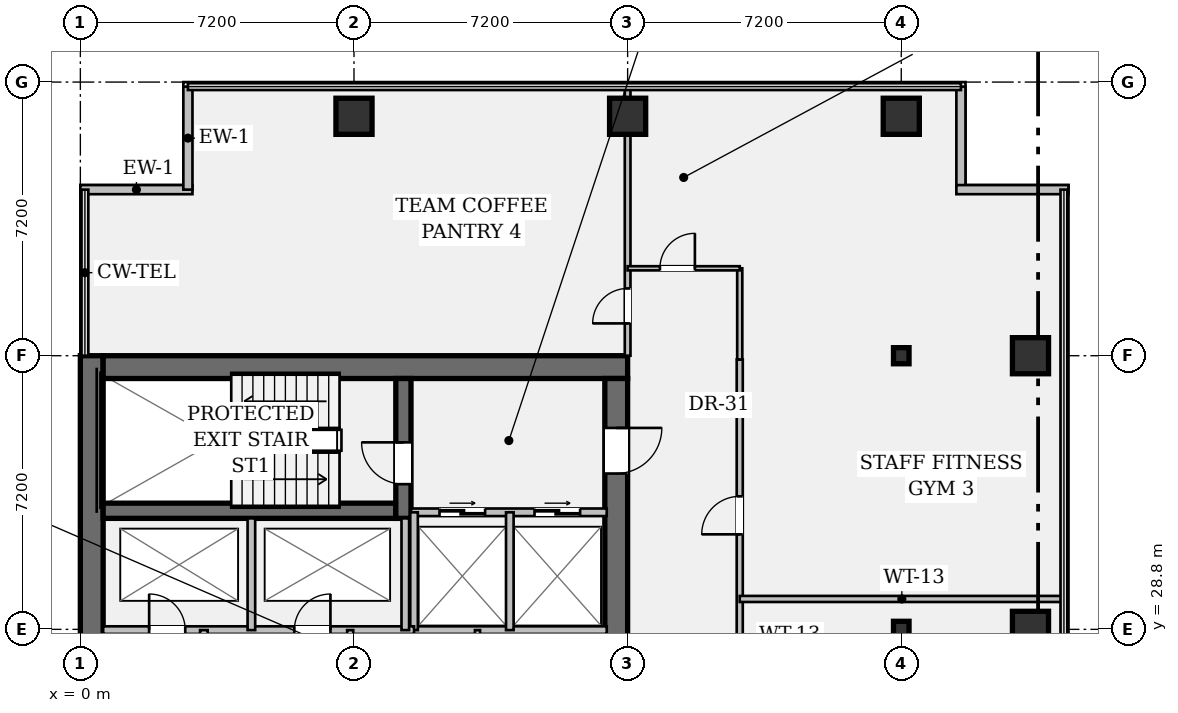
"""IFC4 building model, lengths in metres.
Left out: names, types, materials, properties, quantities, classifications, styles, units other than length and angle.
Written with IfcOpenShell. Run it as: python <this file> out.ifc"""

import sys

from ifc_helpers import new_model, si_unit, direction, frame, frame_2d, origin, origin_2d, place, context, subcontext, project, spatial, rectangle, hollow_rectangle, i_section, extrude, element, fill, save


model = new_model("IFC4")
c1 = context("Model", 3, precision=1e-05, world=origin(), true_north=direction((0.0, 1.0)))
c2 = subcontext(c1, "Body", "Model", "MODEL_VIEW")
j1 = project(units=[si_unit("LENGTHUNIT", "METRE"), si_unit("PLANEANGLEUNIT", "RADIAN")], contexts=[c1])
p1 = place(None, origin())
s1 = spatial("IfcSite", under=j1, at=p1, CompositionType="ELEMENT")
p2 = place(p1, origin())
s2 = spatial("IfcBuilding", under=s1, at=p2, CompositionType="ELEMENT")
p3 = place(p2, frame((0.0, 0.0, 109.9)))
s3 = spatial("IfcBuildingStorey", under=s2, at=p3, CompositionType="ELEMENT", Elevation=109.9)
p4 = place(p3, frame((0.3, 7.2, 0.0), z_axis=(0.0, 0.0, 1.0), x_axis=(0.0, 1.0, 0.0)))
e1 = element("IfcWall", 1, at=p4, inside=s3, PredefinedType="SHEAR", context=c2, shape_type="SweptSolid", body=[
    extrude(rectangle(XDim=28.8, YDim=0.6, at=frame_2d((14.4, 0.0))), origin(), (0.0, 0.0, 1.0), 3.58),
])
p5 = place(p3, frame((0.6, 35.7, 0.0), z_axis=(0.0, 0.0, 1.0), x_axis=(1.0, 0.0, 0.0)))
e2 = element("IfcWall", 2, at=p5, inside=s3, PredefinedType="SHEAR", context=c2, shape_type="SweptSolid", body=[
    extrude(rectangle(XDim=13.8, YDim=0.6, at=frame_2d((6.9, 0.0))), origin(), (0.0, 0.0, 1.0), 3.58),
])
p6 = place(p3, frame((14.1, 35.4, 0.0), z_axis=(0.0, 0.0, 1.0), x_axis=(0.0, -1.0, 0.0)))
e3 = element("IfcWall", 3, at=p6, inside=s3, PredefinedType="SHEAR", context=c2, shape_type="SweptSolid", body=[
    extrude(rectangle(XDim=27.6, YDim=0.6, at=frame_2d((13.8, 0.0))), origin(), (0.0, 0.0, 1.0), 3.58),
])
p7 = place(p6, frame((1.3, 0.0, 0.0)))
e4 = element("IfcOpeningElement", 4, at=p7, cuts=e3, PredefinedType="OPENING", context=c2, shape_type="SweptSolid", body=[
    extrude(rectangle(XDim=1.2, YDim=2.15, at=frame_2d((0.6, 1.075))), frame((0.0, 0.312, 0.0), z_axis=(0.0, -1.0, 0.0), x_axis=(1.0, 0.0, 0.0)), (0.0, 0.0, 1.0), 0.624),
])
p8 = place(p6, frame((25.25, 0.0, 0.0)))
e5 = element("IfcOpeningElement", 5, at=p8, cuts=e3, PredefinedType="OPENING", context=c2, shape_type="SweptSolid", body=[
    extrude(rectangle(XDim=1.2, YDim=2.15, at=frame_2d((0.6, 1.075))), frame((0.0, 0.312, 0.0), z_axis=(0.0, -1.0, 0.0), x_axis=(1.0, 0.0, 0.0)), (0.0, 0.0, 1.0), 0.624),
])
p9 = place(p6, frame((14.6, 0.0, 0.0)))
e6 = element("IfcOpeningElement", 6, at=p9, cuts=e3, PredefinedType="OPENING", context=c2, shape_type="SweptSolid", body=[
    extrude(rectangle(XDim=1.6, YDim=2.2, at=frame_2d((0.8, 1.1))), frame((0.0, 0.312, 0.0), z_axis=(0.0, -1.0, 0.0), x_axis=(1.0, 0.0, 0.0)), (0.0, 0.0, 1.0), 0.624),
])
p10 = place(p3, frame((0.6, 31.92, 0.0), z_axis=(0.0, 0.0, 1.0), x_axis=(1.0, 0.0, 0.0)))
e7 = element("IfcWall", 7, at=p10, inside=s3, PredefinedType="SHEAR", context=c2, shape_type="SweptSolid", body=[
    extrude(rectangle(XDim=7.7, YDim=0.4, at=frame_2d((3.85, 0.0))), origin(), (0.0, 0.0, 1.0), 3.58),
])
p11 = place(p3, frame((8.5, 31.72, 0.0), z_axis=(0.0, 0.0, 1.0), x_axis=(0.0, 1.0, 0.0)))
e8 = element("IfcWall", 8, at=p11, inside=s3, PredefinedType="SHEAR", context=c2, shape_type="SweptSolid", body=[
    extrude(rectangle(XDim=3.68, YDim=0.4, at=frame_2d((1.84, 0.0))), origin(), (0.0, 0.0, 1.0), 3.58),
])
p12 = place(p11, frame((0.9, 0.0, 0.0)))
e9 = element("IfcOpeningElement", 9, at=p12, cuts=e8, PredefinedType="OPENING", context=c2, shape_type="SweptSolid", body=[
    extrude(rectangle(XDim=1.1, YDim=2.15, at=frame_2d((0.55, 1.075))), frame((0.0, 0.212, 0.0), z_axis=(0.0, -1.0, 0.0), x_axis=(1.0, 0.0, 0.0)), (0.0, 0.0, 1.0), 0.424),
])
for number, where, z_axis, x_axis in (
    (10, (7.2, 42.3, 0.0), (0.0, 0.0, 1.0), (1.0, 0.0, 0.0)),
    (11, (14.4, 42.3, 0.0), (0.0, 0.0, 1.0), (1.0, 0.0, 0.0)),
):
    element("IfcColumn", number, at=place(p3, frame(where, z_axis=z_axis, x_axis=x_axis)), inside=s3, PredefinedType="COLUMN", context=c2, shape_type="SweptSolid", body=[
        extrude(hollow_rectangle(XDim=0.95, YDim=0.95, WallThickness=0.06, at=origin_2d()), origin(), (0.0, 0.0, 1.0), 3.58),
    ])
for number, where, z_axis, x_axis in (
    (12, (21.6, 28.8, 0.0), (0.0, 0.0, 1.0), (1.0, 0.0, 0.0)),
    (13, (21.6, 36.0, 0.0), (0.0, 0.0, 1.0), (1.0, 0.0, 0.0)),
):
    element("IfcColumn", number, at=place(p3, frame(where, z_axis=z_axis, x_axis=x_axis)), inside=s3, PredefinedType="COLUMN", context=c2, shape_type="SweptSolid", body=[
        extrude(i_section(OverallWidth=0.409, OverallDepth=0.424, WebThickness=0.033, FlangeThickness=0.052, FilletRadius=0.018, at=origin_2d()), origin(), (0.0, 0.0, 1.0), 3.58),
    ])
for number, where, z_axis, x_axis in (
    (14, (21.6, 42.3, 0.0), (0.0, 0.0, 1.0), (1.0, 0.0, 0.0)),
    (15, (25.0, 28.8, 0.0), (0.0, 0.0, 1.0), (1.0, 0.0, 0.0)),
    (16, (25.0, 36.0, 0.0), (0.0, 0.0, 1.0), (1.0, 0.0, 0.0)),
):
    element("IfcColumn", number, at=place(p3, frame(where, z_axis=z_axis, x_axis=x_axis)), inside=s3, PredefinedType="COLUMN", context=c2, shape_type="SweptSolid", body=[
        extrude(hollow_rectangle(XDim=0.95, YDim=0.95, WallThickness=0.06, at=origin_2d()), origin(), (0.0, 0.0, 1.0), 3.58),
    ])
p13 = place(p3, frame((0.0, 40.37, 0.0), z_axis=(0.0, 0.0, 1.0), x_axis=(1.0, 0.0, 0.0)))
e17 = element("IfcWall", 17, at=p13, inside=s3, PredefinedType="STANDARD", context=c2, shape_type="SweptSolid", body=[
    extrude(rectangle(XDim=2.95, YDim=0.24, at=frame_2d((1.475, 0.0))), origin(), (0.0, 0.0, 1.0), 3.58),
])
for number, where, z_axis, x_axis in (
    (18, (2.83, 40.37, 0.0), (0.0, 0.0, 1.0), (0.0, 1.0, 0.0)),
    (19, (23.17, 43.08, 0.0), (0.0, 0.0, 1.0), (0.0, -1.0, 0.0)),
):
    element("IfcWall", number, at=place(p3, frame(where, z_axis=z_axis, x_axis=x_axis)), inside=s3, PredefinedType="STANDARD", context=c2, shape_type="SweptSolid", body=[
        extrude(rectangle(XDim=2.71, YDim=0.24, at=frame_2d((1.355, 0.0))), origin(), (0.0, 0.0, 1.0), 3.58),
    ])
p14 = place(p3, frame((23.05, 40.37, 0.0), z_axis=(0.0, 0.0, 1.0), x_axis=(1.0, 0.0, 0.0)))
e20 = element("IfcWall", 20, at=p14, inside=s3, PredefinedType="STANDARD", context=c2, shape_type="SweptSolid", body=[
    extrude(rectangle(XDim=2.95, YDim=0.24, at=frame_2d((1.475, 0.0))), origin(), (0.0, 0.0, 1.0), 3.58),
])
p15 = place(p3, frame((8.7, 31.88, 0.0), z_axis=(0.0, 0.0, 1.0), x_axis=(1.0, 0.0, 0.0)))
e21 = element("IfcWall", 21, at=p15, inside=s3, PredefinedType="PARTITIONING", context=c2, shape_type="SweptSolid", body=[
    extrude(rectangle(XDim=5.15, YDim=0.2, at=frame_2d((2.575, 0.0))), origin(), (0.0, 0.0, 1.0), 3.58),
])
p16 = place(p15, frame((0.75, 0.0, 0.0)))
e22 = element("IfcOpeningElement", 22, at=p16, cuts=e21, PredefinedType="OPENING", context=c2, shape_type="SweptSolid", body=[
    extrude(rectangle(XDim=1.2, YDim=2.2, at=frame_2d((0.6, 1.1))), frame((0.0, 0.112, 0.0), z_axis=(0.0, -1.0, 0.0), x_axis=(1.0, 0.0, 0.0)), (0.0, 0.0, 1.0), 0.224),
])
p17 = place(p15, frame((3.25, 0.0, 0.0)))
e23 = element("IfcOpeningElement", 23, at=p17, cuts=e21, PredefinedType="OPENING", context=c2, shape_type="SweptSolid", body=[
    extrude(rectangle(XDim=1.2, YDim=2.2, at=frame_2d((0.6, 1.1))), frame((0.0, 0.112, 0.0), z_axis=(0.0, -1.0, 0.0), x_axis=(1.0, 0.0, 0.0)), (0.0, 0.0, 1.0), 0.224),
])
p18 = place(p3, frame((8.7, 28.78, 0.0), z_axis=(0.0, 0.0, 1.0), x_axis=(1.0, 0.0, 0.0)))
e24 = element("IfcWall", 24, at=p18, inside=s3, PredefinedType="PARTITIONING", context=c2, shape_type="SweptSolid", body=[
    extrude(rectangle(XDim=5.15, YDim=0.2, at=frame_2d((2.575, 0.0))), origin(), (0.0, 0.0, 1.0), 3.58),
])
for number, where, z_axis, x_axis in (
    (25, (8.78, 28.78, 0.0), (0.0, 0.0, 1.0), (0.0, 1.0, 0.0)),
    (26, (11.3, 28.78, 0.0), (0.0, 0.0, 1.0), (0.0, 1.0, 0.0)),
):
    element("IfcWall", number, at=place(p3, frame(where, z_axis=z_axis, x_axis=x_axis)), inside=s3, PredefinedType="PARTITIONING", context=c2, shape_type="SweptSolid", body=[
        extrude(rectangle(XDim=3.1, YDim=0.2, at=frame_2d((1.55, 0.0))), origin(), (0.0, 0.0, 1.0), 3.58),
    ])
p19 = place(p3, frame((0.6, 28.78, 0.0), z_axis=(0.0, 0.0, 1.0), x_axis=(1.0, 0.0, 0.0)))
e27 = element("IfcWall", 27, at=p19, inside=s3, PredefinedType="PARTITIONING", context=c2, shape_type="SweptSolid", body=[
    extrude(rectangle(XDim=8.18, YDim=0.2, at=frame_2d((4.09, 0.0))), origin(), (0.0, 0.0, 1.0), 3.58),
])
p20 = place(p19, frame((1.21, 0.0, 0.0)))
e28 = element("IfcOpeningElement", 28, at=p20, cuts=e27, PredefinedType="OPENING", context=c2, shape_type="SweptSolid", body=[
    extrude(rectangle(XDim=0.95, YDim=2.15, at=frame_2d((0.475, 1.075))), frame((0.0, 0.112, 0.0), z_axis=(0.0, -1.0, 0.0), x_axis=(1.0, 0.0, 0.0)), (0.0, 0.0, 1.0), 0.224),
])
p21 = place(p19, frame((5.03, 0.0, 0.0)))
e29 = element("IfcOpeningElement", 29, at=p21, cuts=e27, PredefinedType="OPENING", context=c2, shape_type="SweptSolid", body=[
    extrude(rectangle(XDim=0.95, YDim=2.15, at=frame_2d((0.475, 1.075))), frame((0.0, 0.112, 0.0), z_axis=(0.0, -1.0, 0.0), x_axis=(1.0, 0.0, 0.0)), (0.0, 0.0, 1.0), 0.224),
])
for number, where, z_axis, x_axis in (
    (30, (4.5, 28.78, 0.0), (0.0, 0.0, 1.0), (0.0, 1.0, 0.0)),
    (31, (8.55, 28.78, 0.0), (0.0, 0.0, 1.0), (0.0, 1.0, 0.0)),
):
    element("IfcWall", number, at=place(p3, frame(where, z_axis=z_axis, x_axis=x_axis)), inside=s3, PredefinedType="PARTITIONING", context=c2, shape_type="SweptSolid", body=[
        extrude(rectangle(XDim=2.94, YDim=0.2, at=frame_2d((1.47, 0.0))), origin(), (0.0, 0.0, 1.0), 3.58),
    ])
p22 = place(p3, frame((3.25, 15.7, 0.0), z_axis=(0.0, 0.0, 1.0), x_axis=(0.0, 1.0, 0.0)))
e32 = element("IfcWall", 32, at=p22, inside=s3, PredefinedType="PARTITIONING", context=c2, shape_type="SweptSolid", body=[
    extrude(rectangle(XDim=13.08, YDim=0.2, at=frame_2d((6.54, 0.0))), origin(), (0.0, 0.0, 1.0), 3.58),
])
p23 = place(p3, frame((7.1, 22.2, 0.0), z_axis=(0.0, 0.0, 1.0), x_axis=(0.0, 1.0, 0.0)))
e33 = element("IfcWall", 33, at=p23, inside=s3, PredefinedType="PARTITIONING", context=c2, shape_type="SweptSolid", body=[
    extrude(rectangle(XDim=6.58, YDim=0.16, at=frame_2d((3.29, 0.0))), origin(), (0.0, 0.0, 1.0), 3.58),
])
p24 = place(p3, frame((10.45, 22.2, 0.0), z_axis=(0.0, 0.0, 1.0), x_axis=(0.0, 1.0, 0.0)))
e34 = element("IfcWall", 34, at=p24, inside=s3, PredefinedType="PARTITIONING", context=c2, shape_type="SweptSolid", body=[
    extrude(rectangle(XDim=6.58, YDim=0.135, at=frame_2d((3.29, 0.0))), origin(), (0.0, 0.0, 1.0), 3.58),
])
p25 = place(p3, frame((17.35, 20.7, 0.0), z_axis=(0.0, 0.0, 1.0), x_axis=(0.0, 1.0, 0.0)))
e35 = element("IfcWall", 35, at=p25, inside=s3, PredefinedType="PARTITIONING", context=c2, shape_type="SweptSolid", body=[
    extrude(rectangle(XDim=15.2, YDim=0.16, at=frame_2d((7.6, 0.0))), origin(), (0.0, 0.0, 1.0), 2.793),
])
p26 = place(p25, frame((5.2, 0.0, 0.0)))
e36 = element("IfcOpeningElement", 36, at=p26, cuts=e35, PredefinedType="OPENING", context=c2, shape_type="SweptSolid", body=[
    extrude(rectangle(XDim=0.92, YDim=2.15, at=frame_2d((0.46, 1.075))), frame((0.0, 0.092, 0.0), z_axis=(0.0, -1.0, 0.0), x_axis=(1.0, 0.0, 0.0)), (0.0, 0.0, 1.0), 0.184),
])
p27 = place(p25, frame((10.6, 0.0, 0.0)))
e37 = element("IfcOpeningElement", 37, at=p27, cuts=e35, PredefinedType="OPENING", context=c2, shape_type="SweptSolid", body=[
    extrude(rectangle(XDim=1.0, YDim=2.15, at=frame_2d((0.5, 1.075))), frame((0.0, 0.092, 0.0), z_axis=(0.0, -1.0, 0.0), x_axis=(1.0, 0.0, 0.0)), (0.0, 0.0, 1.0), 0.184),
])
p28 = place(p3, frame((17.35, 29.6, 0.0), z_axis=(0.0, 0.0, 1.0), x_axis=(1.0, 0.0, 0.0)))
e38 = element("IfcWall", 38, at=p28, inside=s3, PredefinedType="PARTITIONING", context=c2, shape_type="SweptSolid", body=[
    extrude(rectangle(XDim=8.53, YDim=0.16, at=frame_2d((4.265, 0.0))), origin(), (0.0, 0.0, 1.0), 2.793),
])
p29 = place(p3, frame((14.4, 36.0, 0.0), z_axis=(0.0, 0.0, 1.0), x_axis=(0.0, 1.0, 0.0)))
e39 = element("IfcWall", 39, at=p29, inside=s3, PredefinedType="PARTITIONING", context=c2, shape_type="SweptSolid", body=[
    extrude(rectangle(XDim=7.08, YDim=0.15, at=frame_2d((3.54, 0.0))), origin(), (0.0, 0.0, 1.0), 2.793),
])
p30 = place(p29, frame((0.85, 0.0, 0.0)))
e40 = element("IfcOpeningElement", 40, at=p30, cuts=e39, PredefinedType="OPENING", context=c2, shape_type="SweptSolid", body=[
    extrude(rectangle(XDim=0.92, YDim=2.15, at=frame_2d((0.46, 1.075))), frame((0.0, 0.087, 0.0), z_axis=(0.0, -1.0, 0.0), x_axis=(1.0, 0.0, 0.0)), (0.0, 0.0, 1.0), 0.174),
])
p31 = place(p3, frame((17.35, 35.9, 0.0), z_axis=(0.0, 0.0, 1.0), x_axis=(0.0, 1.0, 0.0)))
e41 = element("IfcWall", 41, at=p31, inside=s3, PredefinedType="PARTITIONING", context=c2, shape_type="SweptSolid", body=[
    extrude(rectangle(XDim=2.4, YDim=0.135, at=frame_2d((1.2, 0.0))), origin(), (0.0, 0.0, 1.0), 2.793),
])
p32 = place(p3, frame((14.4, 38.3, 0.0), z_axis=(0.0, 0.0, 1.0), x_axis=(1.0, 0.0, 0.0)))
e42 = element("IfcWall", 42, at=p32, inside=s3, PredefinedType="PARTITIONING", context=c2, shape_type="SweptSolid", body=[
    extrude(rectangle(XDim=2.95, YDim=0.11, at=frame_2d((1.475, 0.0))), origin(), (0.0, 0.0, 1.0), 3.098),
])
p33 = place(p32, frame((0.85, 0.0, 0.0)))
e43 = element("IfcOpeningElement", 43, at=p33, cuts=e42, PredefinedType="OPENING", context=c2, shape_type="SweptSolid", body=[
    extrude(rectangle(XDim=0.92, YDim=2.15, at=frame_2d((0.46, 1.075))), frame((0.0, 0.067, 0.0), z_axis=(0.0, -1.0, 0.0), x_axis=(1.0, 0.0, 0.0)), (0.0, 0.0, 1.0), 0.134),
])
p34 = place(p12, origin())
e44 = element("IfcDoor", 44, at=p34, inside=s3, OperationType="SINGLE_SWING_RIGHT", PredefinedType="DOOR", context=c2, shape_type="SweptSolid", body=[
    extrude(rectangle(XDim=1.1, YDim=2.15, at=frame_2d((0.55, 1.075))), frame((0.0, 0.025, 0.0), z_axis=(0.0, -1.0, 0.0), x_axis=(1.0, 0.0, 0.0)), (0.0, 0.0, 1.0), 0.05),
])
fill(e9, e44)
p35 = place(p7, origin())
e45 = element("IfcDoor", 45, at=p35, inside=s3, OperationType="SINGLE_SWING_LEFT", PredefinedType="DOOR", context=c2, shape_type="SweptSolid", body=[
    extrude(rectangle(XDim=1.2, YDim=2.15, at=frame_2d((0.6, 1.075))), frame((0.0, 0.025, 0.0), z_axis=(0.0, -1.0, 0.0), x_axis=(1.0, 0.0, 0.0)), (0.0, 0.0, 1.0), 0.05),
])
fill(e4, e45)
p36 = place(p16, origin())
e46 = element("IfcDoor", 46, at=p36, inside=s3, OperationType="DOUBLE_DOOR_SLIDING", PredefinedType="DOOR", context=c2, shape_type="SweptSolid", body=[
    extrude(rectangle(XDim=1.2, YDim=2.2, at=frame_2d((0.6, 1.1))), frame((0.0, 0.025, 0.0), z_axis=(0.0, -1.0, 0.0), x_axis=(1.0, 0.0, 0.0)), (0.0, 0.0, 1.0), 0.05),
])
fill(e22, e46)
p37 = place(p17, origin())
e47 = element("IfcDoor", 47, at=p37, inside=s3, OperationType="DOUBLE_DOOR_SLIDING", PredefinedType="DOOR", context=c2, shape_type="SweptSolid", body=[
    extrude(rectangle(XDim=1.2, YDim=2.2, at=frame_2d((0.6, 1.1))), frame((0.0, 0.025, 0.0), z_axis=(0.0, -1.0, 0.0), x_axis=(1.0, 0.0, 0.0)), (0.0, 0.0, 1.0), 0.05),
])
fill(e23, e47)
p38 = place(p20, origin())
e48 = element("IfcDoor", 48, at=p38, inside=s3, OperationType="SINGLE_SWING_LEFT", PredefinedType="DOOR", context=c2, shape_type="SweptSolid", body=[
    extrude(rectangle(XDim=0.95, YDim=2.15, at=frame_2d((0.475, 1.075))), frame((0.0, 0.025, 0.0), z_axis=(0.0, -1.0, 0.0), x_axis=(1.0, 0.0, 0.0)), (0.0, 0.0, 1.0), 0.05),
])
fill(e28, e48)
p39 = place(p21, origin())
e49 = element("IfcDoor", 49, at=p39, inside=s3, OperationType="SINGLE_SWING_RIGHT", PredefinedType="DOOR", context=c2, shape_type="SweptSolid", body=[
    extrude(rectangle(XDim=0.95, YDim=2.15, at=frame_2d((0.475, 1.075))), frame((0.0, 0.025, 0.0), z_axis=(0.0, -1.0, 0.0), x_axis=(1.0, 0.0, 0.0)), (0.0, 0.0, 1.0), 0.05),
])
fill(e29, e49)
p40 = place(p27, origin())
e50 = element("IfcDoor", 50, at=p40, inside=s3, OperationType="SINGLE_SWING_LEFT", PredefinedType="DOOR", context=c2, shape_type="SweptSolid", body=[
    extrude(rectangle(XDim=1.0, YDim=2.15, at=frame_2d((0.5, 1.075))), frame((0.0, 0.025, 0.0), z_axis=(0.0, -1.0, 0.0), x_axis=(1.0, 0.0, 0.0)), (0.0, 0.0, 1.0), 0.05),
])
fill(e37, e50)
p41 = place(p30, origin())
e51 = element("IfcDoor", 51, at=p41, inside=s3, OperationType="SINGLE_SWING_LEFT", PredefinedType="DOOR", context=c2, shape_type="SweptSolid", body=[
    extrude(rectangle(XDim=0.92, YDim=2.15, at=frame_2d((0.46, 1.075))), frame((0.0, 0.025, 0.0), z_axis=(0.0, -1.0, 0.0), x_axis=(1.0, 0.0, 0.0)), (0.0, 0.0, 1.0), 0.05),
])
fill(e40, e51)
p42 = place(p33, origin())
e52 = element("IfcDoor", 52, at=p42, inside=s3, OperationType="SINGLE_SWING_RIGHT", PredefinedType="DOOR", context=c2, shape_type="SweptSolid", body=[
    extrude(rectangle(XDim=0.92, YDim=2.15, at=frame_2d((0.46, 1.075))), frame((0.0, 0.025, 0.0), z_axis=(0.0, -1.0, 0.0), x_axis=(1.0, 0.0, 0.0)), (0.0, 0.0, 1.0), 0.05),
])
fill(e43, e52)
save(model, sys.argv[1])
